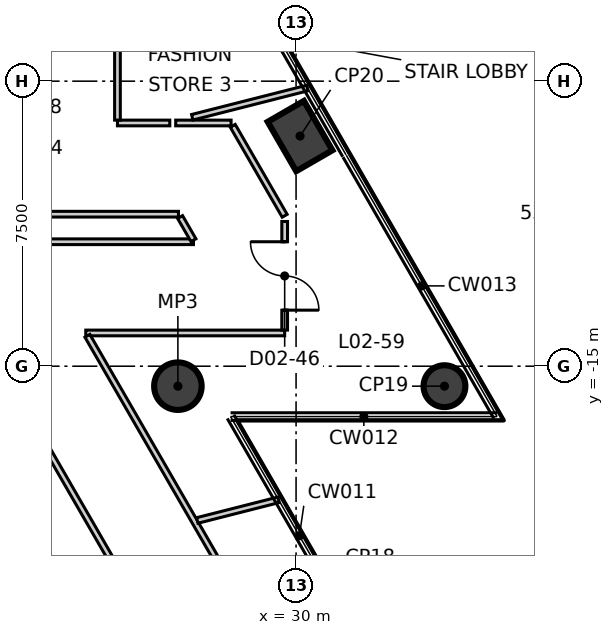
"""IFC4 building model, lengths in metres.
Left out: names, types, materials, properties, quantities, classifications, styles, units other than length and angle.
Written with IfcOpenShell. Run it as: python <this file> out.ifc"""

import sys

from ifc_helpers import new_model, si_unit, direction, frame, frame_2d, origin, origin_2d, place, context, subcontext, project, spatial, rectangle, circle, extrude, element, fill, save


model = new_model("IFC4")
c1 = context("Model", 3, precision=1e-05, world=origin(), true_north=direction((0.0, 1.0)))
c2 = subcontext(c1, "Body", "Model", "MODEL_VIEW")
j1 = project(units=[si_unit("LENGTHUNIT", "METRE"), si_unit("PLANEANGLEUNIT", "RADIAN")], contexts=[c1])
p1 = place(None, origin())
s1 = spatial("IfcSite", under=j1, at=p1, CompositionType="ELEMENT")
p2 = place(p1, origin())
s2 = spatial("IfcBuilding", under=s1, at=p2, CompositionType="ELEMENT")
p3 = place(p2, frame((0.0, 0.0, 14.5)))
s3 = spatial("IfcBuildingStorey", under=s2, at=p3, CompositionType="ELEMENT", Elevation=14.5)
p4 = place(p3, frame((33.905, -15.525, -0.4), z_axis=(0.0, 0.0, 1.0), x_axis=(-0.5, 0.866025403784, 0.0)))
e1 = element("IfcColumn", 1, at=p4, inside=s3, PredefinedType="COLUMN", context=c2, shape_type="SweptSolid", body=[
    extrude(circle(Radius=0.55, at=origin_2d()), origin(), (0.0, 0.0, 1.0), 5.4),
])
p5 = place(p3, frame((30.105, -8.944, -0.4), z_axis=(0.0, 0.0, 1.0), x_axis=(-0.5, 0.866025403784, 0.0)))
e2 = element("IfcColumn", 2, at=p5, inside=s3, PredefinedType="COLUMN", context=c2, shape_type="SweptSolid", body=[
    extrude(rectangle(XDim=1.5, YDim=1.1, at=origin_2d()), origin(), (0.0, 0.0, 1.0), 5.4),
])
p6 = place(p3, frame((26.89, -15.525, -0.4), z_axis=(0.0, 0.0, 1.0), x_axis=(1.0, 0.0, 0.0)))
e3 = element("IfcColumn", 3, at=p6, inside=s3, PredefinedType="COLUMN", context=c2, shape_type="SweptSolid", body=[
    extrude(circle(Radius=0.625, at=origin_2d()), origin(), (0.0, 0.0, 1.0), 5.4),
])
p7 = place(p3, frame((25.3, -8.6, 0.0), z_axis=(0.0, 0.0, 1.0), x_axis=(1.0, 0.0, 0.0)))
e4 = element("IfcWall", 4, at=p7, inside=s3, PredefinedType="PARTITIONING", context=c2, shape_type="SweptSolid", body=[
    extrude(rectangle(XDim=1.377, YDim=0.15, at=frame_2d((0.688, 0.0))), origin(), (0.0, 0.0, 1.0), 5.0),
])
p8 = place(p3, frame((26.832, -8.6, 0.0), z_axis=(0.0, 0.0, 1.0), x_axis=(1.0, 0.0, 0.0)))
e5 = element("IfcWall", 5, at=p8, inside=s3, PredefinedType="PARTITIONING", context=c2, shape_type="SweptSolid", body=[
    extrude(rectangle(XDim=1.458, YDim=0.15, at=frame_2d((0.729, 0.0))), origin(), (0.0, 0.0, 1.0), 5.0),
])
p9 = place(p3, frame((24.466, -14.125, 0.0), z_axis=(0.0, 0.0, 1.0), x_axis=(1.0, 0.0, 0.0)))
e6 = element("IfcWall", 6, at=p9, inside=s3, PredefinedType="PARTITIONING", context=c2, shape_type="SweptSolid", body=[
    extrude(rectangle(XDim=5.234, YDim=0.15, at=frame_2d((2.617, 0.0))), origin(), (0.0, 0.0, 1.0), 5.0),
])
p10 = place(p3, frame((28.334, -8.675, 0.0), z_axis=(0.0, 0.0, 1.0), x_axis=(0.499838457731, -0.86611865017, 0.0)))
e7 = element("IfcWall", 7, at=p10, inside=s3, PredefinedType="PARTITIONING", context=c2, shape_type="SweptSolid", body=[
    extrude(rectangle(XDim=2.733, YDim=0.15, at=frame_2d((1.366, 0.0))), origin(), (0.0, 0.0, 1.0), 5.0),
])
p11 = place(p3, frame((27.268, -8.45, 0.0), z_axis=(0.0, 0.0, 1.0), x_axis=(0.969212436765, 0.246226018974, 0.0)))
e8 = element("IfcWall", 8, at=p11, inside=s3, PredefinedType="PARTITIONING", context=c2, shape_type="SweptSolid", body=[
    extrude(rectangle(XDim=3.127, YDim=0.15, at=frame_2d((1.563, 0.0))), origin(), (0.0, 0.0, 1.0), 5.0),
])
p12 = place(p3, frame((25.3, -8.525, 0.0), z_axis=(0.0, 0.0, 1.0), x_axis=(0.0, 1.0, 0.0)))
e9 = element("IfcWall", 9, at=p12, inside=s3, PredefinedType="PARTITIONING", context=c2, shape_type="SweptSolid", body=[
    extrude(rectangle(XDim=6.45, YDim=0.15, at=frame_2d((3.225, 0.0))), origin(), (0.0, 0.0, 1.0), 5.0),
])
p13 = place(p12, frame((2.325, 0.0, 0.0)))
e10 = element("IfcOpeningElement", 10, at=p13, cuts=e9, PredefinedType="OPENING", context=c2, shape_type="SweptSolid", body=[
    extrude(rectangle(XDim=1.8, YDim=2.1, at=frame_2d((0.9, 1.05))), frame((0.0, 0.085, 0.0), z_axis=(0.0, -1.0, 0.0), x_axis=(1.0, 0.0, 0.0)), (0.0, 0.0, 1.0), 0.17),
])
p14 = place(p3, frame((29.7, -14.05, 0.0), z_axis=(0.0, 0.0, 1.0), x_axis=(0.0, 1.0, 0.0)))
e11 = element("IfcWall", 11, at=p14, inside=s3, PredefinedType="PARTITIONING", context=c2, shape_type="SweptSolid", body=[
    extrude(rectangle(XDim=2.858, YDim=0.15, at=frame_2d((1.429, 0.0))), origin(), (0.0, 0.0, 1.0), 5.0),
])
p15 = place(p14, frame((0.525, 0.0, 0.0)))
e12 = element("IfcOpeningElement", 12, at=p15, cuts=e11, PredefinedType="OPENING", context=c2, shape_type="SweptSolid", body=[
    extrude(rectangle(XDim=1.8, YDim=2.1, at=frame_2d((0.9, 1.05))), frame((0.0, 0.085, 0.0), z_axis=(0.0, -1.0, 0.0), x_axis=(1.0, 0.0, 0.0)), (0.0, 0.0, 1.0), 0.17),
])
p16 = place(p3, frame((24.509, -14.2, 0.0), z_axis=(0.0, 0.0, 1.0), x_axis=(0.499960629411, -0.866048133212, 0.0)))
e13 = element("IfcWall", 13, at=p16, inside=s3, PredefinedType="PARTITIONING", context=c2, shape_type="SweptSolid", body=[
    extrude(rectangle(XDim=9.613, YDim=0.15, at=frame_2d((4.806, 0.0))), origin(), (0.0, 0.0, 1.0), 5.0),
])
p17 = place(p3, frame((27.4, -19.059, 0.0), z_axis=(0.0, 0.0, 1.0), x_axis=(0.969159133182, 0.246435741258, 0.0)))
e14 = element("IfcWall", 14, at=p17, inside=s3, PredefinedType="PARTITIONING", context=c2, shape_type="SweptSolid", body=[
    extrude(rectangle(XDim=2.208, YDim=0.15, at=frame_2d((1.104, 0.0))), origin(), (0.0, 0.0, 1.0), 5.0),
])
p18 = place(p3, frame((15.0, -11.0, 0.0), z_axis=(0.0, 0.0, 1.0), x_axis=(1.0, 0.0, 0.0)))
e15 = element("IfcWall", 15, at=p18, inside=s3, PredefinedType="PARTITIONING", context=c2, shape_type="SweptSolid", body=[
    extrude(rectangle(XDim=11.905, YDim=0.15, at=frame_2d((5.953, 0.0))), origin(), (0.0, 0.0, 1.0), 5.0),
])
p19 = place(p18, frame((3.171, 0.0, 0.0)))
e16 = element("IfcOpeningElement", 16, at=p19, cuts=e15, PredefinedType="OPENING", context=c2, shape_type="SweptSolid", body=[
    extrude(rectangle(XDim=1.8, YDim=2.1, at=frame_2d((0.9, 1.05))), frame((0.0, 0.085, 0.0), z_axis=(0.0, -1.0, 0.0), x_axis=(1.0, 0.0, 0.0)), (0.0, 0.0, 1.0), 0.17),
])
p20 = place(p3, frame((20.309, -11.725, 0.0), z_axis=(0.0, 0.0, 1.0), x_axis=(1.0, 0.0, 0.0)))
e17 = element("IfcWall", 17, at=p20, inside=s3, PredefinedType="PARTITIONING", context=c2, shape_type="SweptSolid", body=[
    extrude(rectangle(XDim=6.991, YDim=0.15, at=frame_2d((3.496, 0.0))), origin(), (0.0, 0.0, 1.0), 5.0),
])
p21 = place(p3, frame((20.35, -11.801, 0.0), z_axis=(0.0, 0.0, 1.0), x_axis=(0.499894962398, -0.86608603878, 0.0)))
e18 = element("IfcWall", 18, at=p21, inside=s3, PredefinedType="PARTITIONING", context=c2, shape_type="SweptSolid", body=[
    extrude(rectangle(XDim=10.536, YDim=0.15, at=frame_2d((5.268, 0.0))), origin(), (0.0, 0.0, 1.0), 5.0),
])
p22 = place(p3, frame((26.948, -11.075, 0.0), z_axis=(0.0, 0.0, 1.0), x_axis=(0.499792463624, -0.866145191815, 0.0)))
e19 = element("IfcWall", 19, at=p22, inside=s3, PredefinedType="PARTITIONING", context=c2, shape_type="SweptSolid", body=[
    extrude(rectangle(XDim=0.704, YDim=0.15, at=frame_2d((0.352, 0.0))), origin(), (0.0, 0.0, 1.0), 5.0),
])
p23 = place(p15, origin())
e20 = element("IfcDoor", 20, at=p23, inside=s3, OperationType="DOUBLE_DOOR_SINGLE_SWING", PredefinedType="DOOR", context=c2, shape_type="SweptSolid", body=[
    extrude(rectangle(XDim=1.8, YDim=2.1, at=frame_2d((0.9, 1.05))), frame((0.0, 0.025, 0.0), z_axis=(0.0, -1.0, 0.0), x_axis=(1.0, 0.0, 0.0)), (0.0, 0.0, 1.0), 0.05),
])
fill(e12, e20)
save(model, sys.argv[1])
